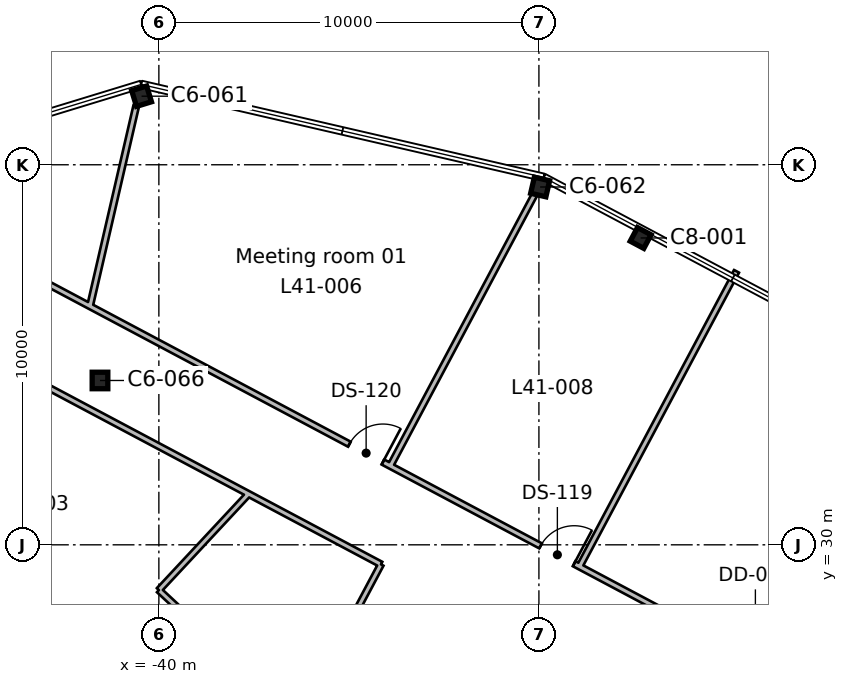
"""IFC4 building model, lengths in metres.
Left out: names, types, materials, properties, quantities, classifications, styles, units other than length and angle.
Written with IfcOpenShell. Run it as: python <this file> out.ifc"""

import sys

from ifc_helpers import new_model, si_unit, direction, frame, frame_2d, origin, origin_2d, place, context, subcontext, project, spatial, rectangle, i_section, extrude, element, fill, save


model = new_model("IFC4")
c1 = context("Model", 3, precision=1e-05, world=origin(), true_north=direction((0.0, 1.0)))
c2 = subcontext(c1, "Body", "Model", "MODEL_VIEW")
j1 = project(units=[si_unit("LENGTHUNIT", "METRE"), si_unit("PLANEANGLEUNIT", "RADIAN")], contexts=[c1])
p1 = place(None, origin())
s1 = spatial("IfcSite", under=j1, at=p1, CompositionType="ELEMENT")
p2 = place(p1, origin())
s2 = spatial("IfcBuilding", under=s1, at=p2, CompositionType="ELEMENT")
p3 = place(p2, frame((0.0, 0.0, 193.5)))
s3 = spatial("IfcBuildingStorey", under=s2, at=p3, CompositionType="ELEMENT", Elevation=193.5)
p4 = place(p3, frame((-41.549, 34.324, 0.0), z_axis=(0.0, 0.0, 1.0), x_axis=(1.0, 0.0, 0.0)))
e1 = element("IfcColumn", 1, at=p4, inside=s3, PredefinedType="COLUMN", context=c2, shape_type="SweptSolid", body=[
    extrude(i_section(OverallWidth=0.412, OverallDepth=0.434, WebThickness=0.036, FlangeThickness=0.057, FilletRadius=0.015, at=origin_2d()), origin(), (0.0, 0.0, 1.0), 3.9),
])
p5 = place(p3, frame((-27.323, 38.074, 0.0), z_axis=(0.0, 0.0, 1.0), x_axis=(-0.882947592859, 0.469471562786, 0.0)))
e2 = element("IfcColumn", 2, at=p5, inside=s3, PredefinedType="COLUMN", context=c2, shape_type="SweptSolid", body=[
    extrude(i_section(OverallWidth=0.404, OverallDepth=0.406, WebThickness=0.027, FlangeThickness=0.044, FilletRadius=0.015, at=origin_2d()), origin(), (0.0, 0.0, 1.0), 3.9),
])
for number, where, z_axis, x_axis in (
    (3, (-29.968, 39.415, 0.0), (0.0, 0.0, 1.0), (-0.974, 0.225, 0.0)),
    (4, (-40.455, 41.804, 0.0), (0.0, 0.0, 1.0), (-0.956, -0.292, 0.0)),
):
    element("IfcColumn", number, at=place(p3, frame(where, z_axis=z_axis, x_axis=x_axis)), inside=s3, PredefinedType="COLUMN", context=c2, shape_type="SweptSolid", body=[
        extrude(i_section(OverallWidth=0.412, OverallDepth=0.434, WebThickness=0.036, FlangeThickness=0.057, FilletRadius=0.015, at=origin_2d()), origin(), (0.0, 0.0, 1.0), 3.9),
    ])
p6 = place(p3, frame((-54.714, 35.096, 0.0), z_axis=(0.0, 0.0, 1.0), x_axis=(0.731373223971, -0.681977424303, 0.0)))
e5 = element("IfcWall", 5, at=p6, inside=s3, PredefinedType="PARTITIONING", context=c2, shape_type="SweptSolid", body=[
    extrude(rectangle(XDim=21.52, YDim=0.15, at=frame_2d((10.76, 0.0))), origin(), (0.0, 0.0, 1.0), 3.54),
])
p7 = place(p3, frame((-41.617, 15.452, 0.0), z_axis=(0.0, 0.0, 1.0), x_axis=(-0.731394449571, 0.681954660617, 0.0)))
e6 = element("IfcWall", 6, at=p7, inside=s3, PredefinedType="PARTITIONING", context=c2, shape_type="SweptSolid", body=[
    extrude(rectangle(XDim=22.207, YDim=0.15, at=frame_2d((11.104, 0.0))), origin(), (0.0, 0.0, 1.0), 3.54),
])
p8 = place(p3, frame((-37.64, 31.339, 0.0), z_axis=(0.0, 0.0, 1.0), x_axis=(-0.681983873773, -0.731367210035, 0.0)))
e7 = element("IfcWall", 7, at=p8, inside=s3, PredefinedType="PARTITIONING", context=c2, shape_type="SweptSolid", body=[
    extrude(rectangle(XDim=3.461, YDim=0.15, at=frame_2d((1.73, 0.0))), origin(), (0.0, 0.0, 1.0), 3.54),
])
p9 = place(p3, frame((-40.0, 28.808, 0.0), z_axis=(0.0, 0.0, 1.0), x_axis=(0.731199369693, -0.682163823257, 0.0)))
e8 = element("IfcWall", 8, at=p9, inside=s3, PredefinedType="PARTITIONING", context=c2, shape_type="SweptSolid", body=[
    extrude(rectangle(XDim=5.014, YDim=0.15, at=frame_2d((2.507, 0.0))), origin(), (0.0, 0.0, 1.0), 3.54),
])
p10 = place(p3, frame((-41.618, 15.45, 0.0), z_axis=(0.0, 0.0, 1.0), x_axis=(0.46945912711, 0.882954204913, 0.0)))
e9 = element("IfcWall", 9, at=p10, inside=s3, PredefinedType="PARTITIONING", context=c2, shape_type="SweptSolid", body=[
    extrude(rectangle(XDim=15.897, YDim=0.15, at=frame_2d((7.948, 0.0))), origin(), (0.0, 0.0, 1.0), 3.54),
])
p11 = place(p10, frame((7.449, 0.0, 0.0)))
e10 = element("IfcOpeningElement", 10, at=p11, cuts=e9, PredefinedType="OPENING", context=c2, shape_type="SweptSolid", body=[
    extrude(rectangle(XDim=1.0, YDim=2.1, at=frame_2d((0.5, 1.05))), frame((0.0, 0.085, 0.0), z_axis=(0.0, -1.0, 0.0), x_axis=(1.0, 0.0, 0.0)), (0.0, 0.0, 1.0), 0.17),
])
p12 = place(p10, frame((4.45, 0.0, 0.0)))
e11 = element("IfcOpeningElement", 11, at=p12, cuts=e9, PredefinedType="OPENING", context=c2, shape_type="SweptSolid", body=[
    extrude(rectangle(XDim=1.0, YDim=2.1, at=frame_2d((0.5, 1.05))), frame((0.0, 0.085, 0.0), z_axis=(0.0, -1.0, 0.0), x_axis=(1.0, 0.0, 0.0)), (0.0, 0.0, 1.0), 0.17),
])
p13 = place(p3, frame((-34.155, 29.486, 0.0), z_axis=(0.0, 0.0, 1.0), x_axis=(-0.882941970897, 0.469482136006, 0.0)))
e12 = element("IfcWall", 12, at=p13, inside=s3, PredefinedType="PARTITIONING", context=c2, shape_type="SweptSolid", body=[
    extrude(rectangle(XDim=19.528, YDim=0.15, at=frame_2d((9.764, 0.0))), origin(), (0.0, 0.0, 1.0), 3.54),
])
p14 = place(p3, frame((-48.541, 39.854, 0.0), z_axis=(0.0, 0.0, 1.0), x_axis=(0.882945008423, -0.469476423372, 0.0)))
e13 = element("IfcWall", 13, at=p14, inside=s3, PredefinedType="PARTITIONING", context=c2, shape_type="SweptSolid", body=[
    extrude(rectangle(XDim=54.976, YDim=0.15, at=frame_2d((27.488, 0.0))), origin(), (0.0, 0.0, 1.0), 3.54),
])
p15 = place(p14, frame((26.55, 0.0, 0.0)))
e14 = element("IfcOpeningElement", 14, at=p15, cuts=e13, PredefinedType="OPENING", context=c2, shape_type="SweptSolid", body=[
    extrude(rectangle(XDim=1.8, YDim=2.1, at=frame_2d((0.9, 1.05))), frame((0.0, 0.085, 0.0), z_axis=(0.0, -1.0, 0.0), x_axis=(1.0, 0.0, 0.0)), (0.0, 0.0, 1.0), 0.17),
])
p16 = place(p14, frame((21.049, 0.0, 0.0)))
e15 = element("IfcOpeningElement", 15, at=p16, cuts=e13, PredefinedType="OPENING", context=c2, shape_type="SweptSolid", body=[
    extrude(rectangle(XDim=1.0, YDim=2.1, at=frame_2d((0.5, 1.05))), frame((0.0, 0.085, 0.0), z_axis=(0.0, -1.0, 0.0), x_axis=(1.0, 0.0, 0.0)), (0.0, 0.0, 1.0), 0.17),
])
p17 = place(p14, frame((15.35, 0.0, 0.0)))
e16 = element("IfcOpeningElement", 16, at=p17, cuts=e13, PredefinedType="OPENING", context=c2, shape_type="SweptSolid", body=[
    extrude(rectangle(XDim=1.0, YDim=2.1, at=frame_2d((0.5, 1.05))), frame((0.0, 0.085, 0.0), z_axis=(0.0, -1.0, 0.0), x_axis=(1.0, 0.0, 0.0)), (0.0, 0.0, 1.0), 0.17),
])
p18 = place(p3, frame((-30.109, 39.225, 0.0), z_axis=(0.0, 0.0, 1.0), x_axis=(-0.469490973279, -0.882937271843, 0.0)))
e17 = element("IfcWall", 17, at=p18, inside=s3, PredefinedType="PARTITIONING", context=c2, shape_type="SweptSolid", body=[
    extrude(rectangle(XDim=8.098, YDim=0.15, at=frame_2d((4.049, 0.0))), origin(), (0.0, 0.0, 1.0), 3.54),
])
p19 = place(p3, frame((-41.813, 36.276, 0.0), z_axis=(0.0, 0.0, 1.0), x_axis=(0.22495163737, 0.974369930183, 0.0)))
e18 = element("IfcWall", 18, at=p19, inside=s3, PredefinedType="PARTITIONING", context=c2, shape_type="SweptSolid", body=[
    extrude(rectangle(XDim=5.419, YDim=0.15, at=frame_2d((2.709, 0.0))), origin(), (0.0, 0.0, 1.0), 3.54),
])
p20 = place(p3, frame((-24.8, 37.197, 0.0), z_axis=(0.0, 0.0, 1.0), x_axis=(-0.469510830369, -0.882926712794, 0.0)))
e19 = element("IfcWall", 19, at=p20, inside=s3, PredefinedType="PARTITIONING", context=c2, shape_type="SweptSolid", body=[
    extrude(rectangle(XDim=8.8, YDim=0.15, at=frame_2d((4.4, 0.0))), origin(), (0.0, 0.0, 1.0), 3.54),
])
p21 = place(p16, origin())
e20 = element("IfcDoor", 20, at=p21, inside=s3, OperationType="SINGLE_SWING_RIGHT", PredefinedType="DOOR", context=c2, shape_type="SweptSolid", body=[
    extrude(rectangle(XDim=1.0, YDim=2.1, at=frame_2d((0.5, 1.05))), frame((0.0, 0.025, 0.0), z_axis=(0.0, -1.0, 0.0), x_axis=(1.0, 0.0, 0.0)), (0.0, 0.0, 1.0), 0.05),
])
fill(e15, e20)
p22 = place(p17, origin())
e21 = element("IfcDoor", 21, at=p22, inside=s3, OperationType="SINGLE_SWING_RIGHT", PredefinedType="DOOR", context=c2, shape_type="SweptSolid", body=[
    extrude(rectangle(XDim=1.0, YDim=2.1, at=frame_2d((0.5, 1.05))), frame((0.0, 0.025, 0.0), z_axis=(0.0, -1.0, 0.0), x_axis=(1.0, 0.0, 0.0)), (0.0, 0.0, 1.0), 0.05),
])
fill(e16, e21)
save(model, sys.argv[1])
